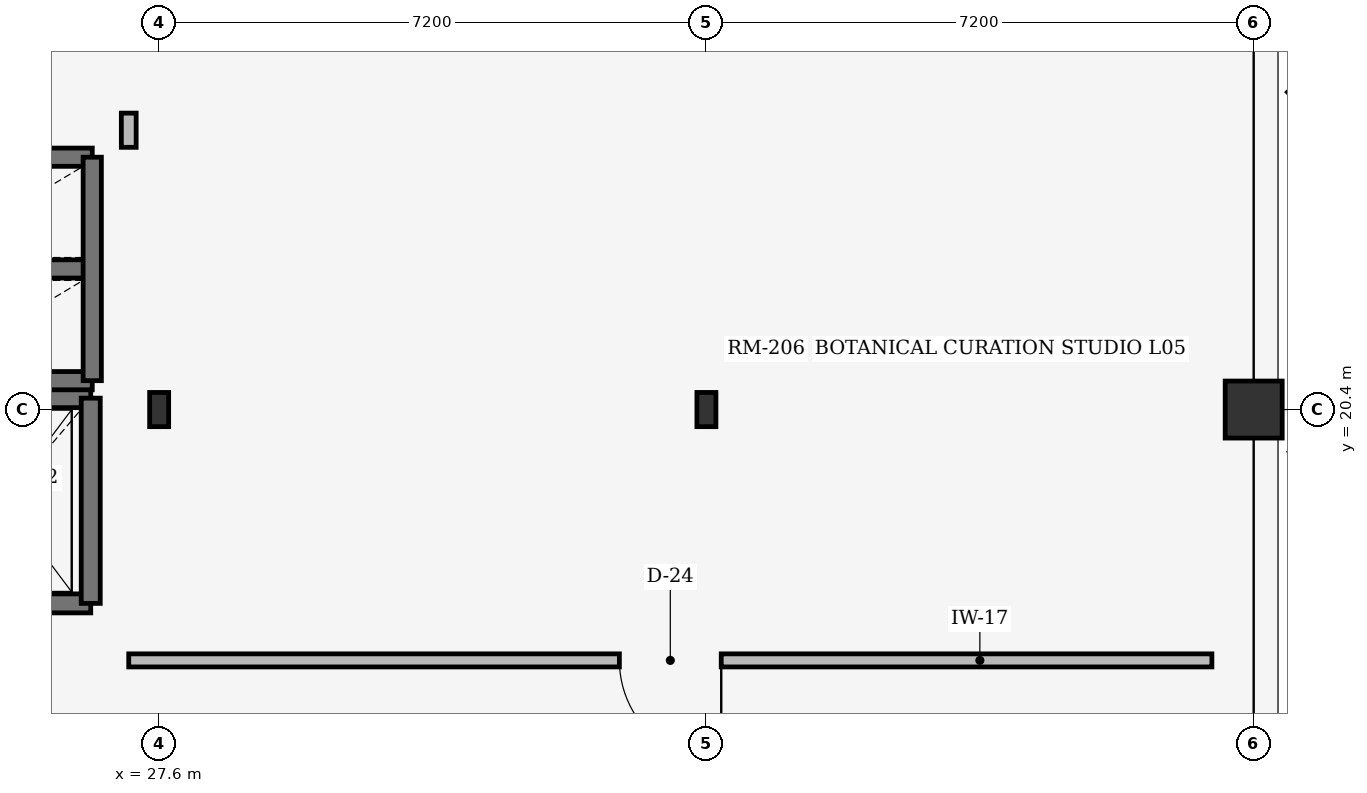
"""IFC4 building model, lengths in metres.
Left out: names, types, materials, properties, quantities, classifications, styles, units other than length and angle.
Written with IfcOpenShell. Run it as: python <this file> out.ifc"""

import sys

from ifc_helpers import new_model, si_unit, direction, frame, frame_2d, origin, origin_2d, place, context, subcontext, project, spatial, rectangle, i_section, extrude, element, fill, save


model = new_model("IFC4")
c1 = context("Model", 3, precision=1e-05, world=origin(), true_north=direction((0.0, 1.0)))
c2 = subcontext(c1, "Body", "Model", "MODEL_VIEW")
j1 = project(units=[si_unit("LENGTHUNIT", "METRE"), si_unit("PLANEANGLEUNIT", "RADIAN")], contexts=[c1])
p1 = place(None, origin())
s1 = spatial("IfcSite", under=j1, at=p1, CompositionType="ELEMENT")
p2 = place(p1, origin())
s2 = spatial("IfcBuilding", under=s1, at=p2, CompositionType="ELEMENT")
p3 = place(p2, frame((0.0, 0.0, 21.0)))
s3 = spatial("IfcBuildingStorey", under=s2, at=p3, CompositionType="ELEMENT", Elevation=21.0)
for number, where, z_axis, x_axis in (
    (1, (27.6, 20.4, 0.0), (0.0, 0.0, 1.0), (1.0, 0.0, 0.0)),
    (2, (34.8, 20.4, 0.0), (0.0, 0.0, 1.0), (1.0, 0.0, 0.0)),
):
    element("IfcColumn", number, at=place(p3, frame(where, z_axis=z_axis, x_axis=x_axis)), inside=s3, PredefinedType="COLUMN", context=c2, shape_type="SweptSolid", body=[
        extrude(i_section(OverallWidth=0.25, OverallDepth=0.45, WebThickness=0.011, FlangeThickness=0.014, at=origin_2d()), origin(), (0.0, 0.0, 1.0), 3.67),
    ])
p4 = place(p3, frame((42.0, 20.4, 0.0), z_axis=(0.0, 0.0, 1.0), x_axis=(1.0, 0.0, 0.0)))
e3 = element("IfcColumn", 3, at=p4, inside=s3, PredefinedType="COLUMN", context=c2, shape_type="SweptSolid", body=[
    extrude(rectangle(XDim=0.75, YDim=0.75, at=origin_2d()), origin(), (0.0, 0.0, 1.0), 3.67),
])
p5 = place(p3, frame((24.4, 17.85, 0.0), z_axis=(0.0, 0.0, 1.0), x_axis=(1.0, 0.0, 0.0)))
e4 = element("IfcWall", 4, at=p5, inside=s3, PredefinedType="SHEAR", context=c2, shape_type="SweptSolid", body=[
    extrude(rectangle(XDim=2.3, YDim=0.25, at=frame_2d((1.15, 0.0))), origin(), (0.0, 0.0, 1.0), 3.67),
])
p6 = place(p5, frame((0.6, 0.0, 0.0)))
e5 = element("IfcOpeningElement", 5, at=p6, cuts=e4, PredefinedType="OPENING", context=c2, shape_type="SweptSolid", body=[
    extrude(rectangle(XDim=1.1, YDim=2.2, at=frame_2d((0.55, 1.1))), frame((0.0, 0.135, 0.0), z_axis=(0.0, -1.0, 0.0), x_axis=(1.0, 0.0, 0.0)), (0.0, 0.0, 1.0), 0.27),
])
p7 = place(p3, frame((24.4, 20.55, 0.0), z_axis=(0.0, 0.0, 1.0), x_axis=(1.0, 0.0, 0.0)))
e6 = element("IfcWall", 6, at=p7, inside=s3, PredefinedType="SHEAR", context=c2, shape_type="SweptSolid", body=[
    extrude(rectangle(XDim=2.3, YDim=0.25, at=frame_2d((1.15, 0.0))), origin(), (0.0, 0.0, 1.0), 3.67),
])
p8 = place(p3, frame((26.7, 17.85, 0.0), z_axis=(0.0, 0.0, 1.0), x_axis=(0.0, 1.0, 0.0)))
e7 = element("IfcWall", 7, at=p8, inside=s3, PredefinedType="SHEAR", context=c2, shape_type="SweptSolid", body=[
    extrude(rectangle(XDim=2.7, YDim=0.25, at=frame_2d((1.35, 0.0))), origin(), (0.0, 0.0, 1.0), 3.67),
])
for number, where, z_axis, x_axis in (
    (8, (24.48, 20.78, 0.0), (0.0, 0.0, 1.0), (1.0, 0.0, 0.0)),
    (9, (24.48, 22.25, 0.0), (0.0, 0.0, 1.0), (1.0, 0.0, 0.0)),
    (10, (24.48, 23.72, 0.0), (0.0, 0.0, 1.0), (1.0, 0.0, 0.0)),
):
    element("IfcWall", number, at=place(p3, frame(where, z_axis=z_axis, x_axis=x_axis)), inside=s3, PredefinedType="SHEAR", context=c2, shape_type="SweptSolid", body=[
        extrude(rectangle(XDim=2.24, YDim=0.24, at=frame_2d((1.12, 0.0))), origin(), (0.0, 0.0, 1.0), 3.67),
    ])
p9 = place(p3, frame((26.72, 20.78, 0.0), z_axis=(0.0, 0.0, 1.0), x_axis=(0.0, 1.0, 0.0)))
e11 = element("IfcWall", 11, at=p9, inside=s3, PredefinedType="SHEAR", context=c2, shape_type="SweptSolid", body=[
    extrude(rectangle(XDim=2.94, YDim=0.24, at=frame_2d((1.47, 0.0))), origin(), (0.0, 0.0, 1.0), 3.67),
])
p10 = place(p3, frame((27.2, 17.1, 0.0), z_axis=(0.0, 0.0, 1.0), x_axis=(1.0, 0.0, 0.0)))
e12 = element("IfcWall", 12, at=p10, inside=s3, PredefinedType="PARTITIONING", context=c2, shape_type="SweptSolid", body=[
    extrude(rectangle(XDim=14.25, YDim=0.172, at=frame_2d((7.125, 0.0))), origin(), (0.0, 0.0, 1.0), 3.65),
])
p11 = place(p10, frame((6.455, 0.0, 0.0)))
e13 = element("IfcOpeningElement", 13, at=p11, cuts=e12, PredefinedType="OPENING", context=c2, shape_type="SweptSolid", body=[
    extrude(rectangle(XDim=1.34, YDim=2.22, at=frame_2d((0.67, 1.11))), frame((0.0, 0.096, 0.0), z_axis=(0.0, -1.0, 0.0), x_axis=(1.0, 0.0, 0.0)), (0.0, 0.0, 1.0), 0.192),
])
p12 = place(p3, frame((27.2, 24.3, 0.0), z_axis=(0.0, 0.0, 1.0), x_axis=(0.0, -1.0, 0.0)))
e14 = element("IfcWall", 14, at=p12, inside=s3, PredefinedType="PARTITIONING", context=c2, shape_type="SweptSolid", body=[
    extrude(rectangle(XDim=0.45, YDim=0.195, at=frame_2d((0.225, 0.0))), origin(), (0.0, 0.0, 1.0), 3.65),
])
p13 = place(p11, origin())
e15 = element("IfcDoor", 15, at=p13, inside=s3, OperationType="SINGLE_SWING_RIGHT", PredefinedType="DOOR", context=c2, shape_type="SweptSolid", body=[
    extrude(rectangle(XDim=1.34, YDim=2.22, at=frame_2d((0.67, 1.11))), frame((0.0, 0.025, 0.0), z_axis=(0.0, -1.0, 0.0), x_axis=(1.0, 0.0, 0.0)), (0.0, 0.0, 1.0), 0.05),
])
fill(e13, e15)
save(model, sys.argv[1])
